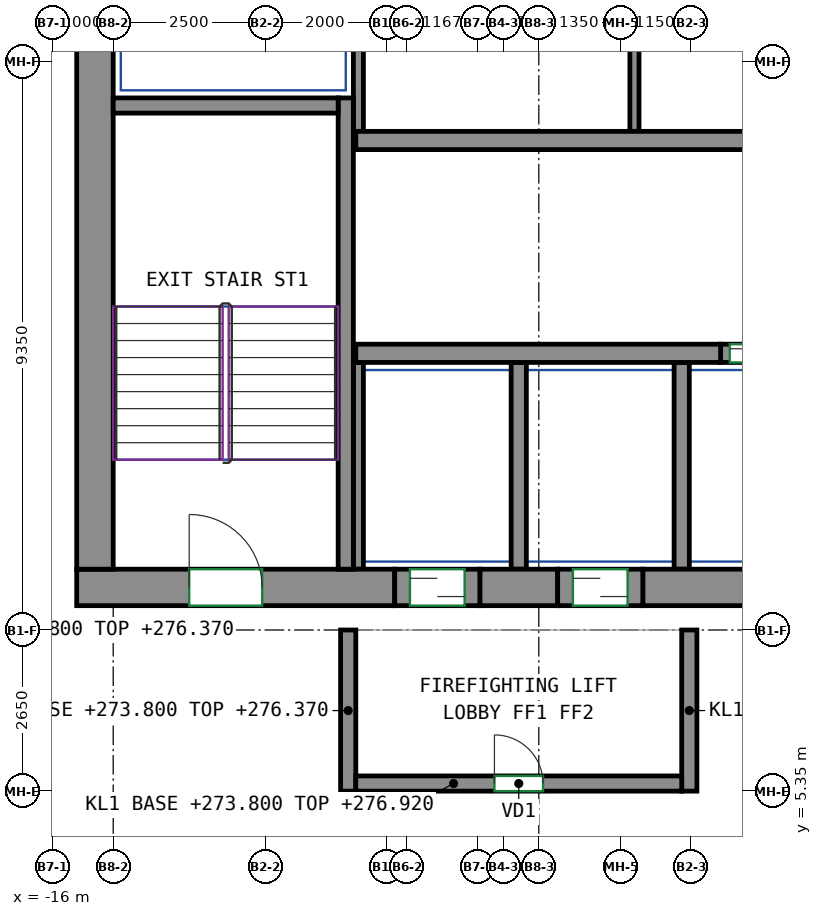
"""IFC4 building model, lengths in metres.
Left out: names, types, materials, properties, quantities, classifications, styles, units other than length and angle.
Written with IfcOpenShell. Run it as: python <this file> out.ifc"""

import sys

from ifc_helpers import new_model, si_unit, direction, frame, frame_2d, origin, place, context, subcontext, project, spatial, rectangle, extrude, source, transform, mapped, element, fill, save


model = new_model("IFC4")
c1 = context("Model", 3, precision=1e-05, world=origin(), true_north=direction((0.0, 1.0)))
c2 = subcontext(c1, "Body", "Model", "MODEL_VIEW")
j1 = project(units=[si_unit("LENGTHUNIT", "METRE"), si_unit("PLANEANGLEUNIT", "RADIAN")], contexts=[c1])
p1 = place(None, origin())
s1 = spatial("IfcSite", under=j1, at=p1, CompositionType="ELEMENT")
p2 = place(p1, origin())
s2 = spatial("IfcBuilding", under=s1, at=p2, CompositionType="ELEMENT")
p3 = place(p2, frame((0.0, 0.0, 273.8)))
s3 = spatial("IfcBuildingStorey", under=s2, at=p3, CompositionType="ELEMENT", Elevation=273.8)
m1 = source(origin(), c2, "Body", "SweptSolid", [
    extrude(rectangle(XDim=5.23, YDim=0.6, at=frame_2d((2.615, 0.0))), origin(), (0.0, 0.0, 1.0), 3.12),
])
p4 = place(p3, frame((-15.6, 8.7, 0.0), z_axis=(0.0, 0.0, 1.0), x_axis=(1.0, 0.0, 0.0)))
e1 = element("IfcWall", 1, at=p4, inside=s3, PredefinedType="SHEAR", context=c2, shape_type="MappedRepresentation", body=[
    mapped(m1, transform((0.0, 0.0, 0.0))),
])
p5 = place(p4, frame((1.85, 0.0, 0.0)))
e2 = element("IfcOpeningElement", 2, at=p5, cuts=e1, PredefinedType="OPENING", context=c2, shape_type="SweptSolid", body=[
    extrude(rectangle(XDim=1.2, YDim=2.1, at=frame_2d((0.6, 1.05))), frame((0.0, 0.31, 0.0), z_axis=(0.0, -1.0, 0.0), x_axis=(1.0, 0.0, 0.0)), (0.0, 0.0, 1.0), 0.62),
])
m2 = source(origin(), c2, "Body", "SweptSolid", [
    extrude(rectangle(XDim=1.28, YDim=0.6, at=frame_2d((0.64, 0.0))), origin(), (0.0, 0.0, 1.0), 3.12),
])
p6 = place(p3, frame((-8.97, 8.7, 0.0), z_axis=(0.0, 0.0, 1.0), x_axis=(1.0, 0.0, 0.0)))
e3 = element("IfcWall", 3, at=p6, inside=s3, PredefinedType="SHEAR", context=c2, shape_type="MappedRepresentation", body=[
    mapped(m2, transform((0.0, 0.0, 0.0))),
])
m3 = source(origin(), c2, "Body", "SweptSolid", [
    extrude(rectangle(XDim=14.18, YDim=0.6, at=frame_2d((7.09, 0.0))), origin(), (0.0, 0.0, 1.0), 3.12),
])
p7 = place(p3, frame((-6.29, 8.7, 0.0), z_axis=(0.0, 0.0, 1.0), x_axis=(1.0, 0.0, 0.0)))
e4 = element("IfcWall", 4, at=p7, inside=s3, PredefinedType="SHEAR", context=c2, shape_type="MappedRepresentation", body=[
    mapped(m3, transform((0.0, 0.0, 0.0))),
])
m4 = source(origin(), c2, "Body", "SweptSolid", [
    extrude(rectangle(XDim=12.0, YDim=0.6, at=frame_2d((6.0, 0.0))), origin(), (0.0, 0.0, 1.0), 3.12),
])
p8 = place(p3, frame((-15.3, 9.0, 0.0), z_axis=(0.0, 0.0, 1.0), x_axis=(0.0, 1.0, 0.0)))
e5 = element("IfcWall", 5, at=p8, inside=s3, PredefinedType="SHEAR", context=c2, shape_type="MappedRepresentation", body=[
    mapped(m4, transform((0.0, 0.0, 0.0))),
])
m5 = source(origin(), c2, "Body", "SweptSolid", [
    extrude(rectangle(XDim=7.75, YDim=0.25, at=frame_2d((3.875, 0.0))), origin(), (0.0, 0.0, 1.0), 3.12),
])
p9 = place(p3, frame((-11.175, 9.0, 0.0), z_axis=(0.0, 0.0, 1.0), x_axis=(0.0, 1.0, 0.0)))
e6 = element("IfcWall", 6, at=p9, inside=s3, PredefinedType="SHEAR", context=c2, shape_type="MappedRepresentation", body=[
    mapped(m5, transform((0.0, 0.0, 0.0))),
])
m6 = source(origin(), c2, "Body", "SweptSolid", [
    extrude(rectangle(XDim=3.7, YDim=0.25, at=frame_2d((1.85, 0.0))), origin(), (0.0, 0.0, 1.0), 3.12),
])
p10 = place(p3, frame((-15.0, 16.625, 0.0), z_axis=(0.0, 0.0, 1.0), x_axis=(1.0, 0.0, 0.0)))
e7 = element("IfcWall", 7, at=p10, inside=s3, PredefinedType="SHEAR", context=c2, shape_type="MappedRepresentation", body=[
    mapped(m6, transform((0.0, 0.0, 0.0))),
])
m7 = source(origin(), c2, "Body", "SweptSolid", [
    extrude(rectangle(XDim=6.0, YDim=0.3, at=frame_2d((3.0, 0.0))), origin(), (0.0, 0.0, 1.0), 3.12),
])
p11 = place(p3, frame((-11.01, 12.55, 0.0), z_axis=(0.0, 0.0, 1.0), x_axis=(1.0, 0.0, 0.0)))
e8 = element("IfcWall", 8, at=p11, inside=s3, PredefinedType="SHEAR", context=c2, shape_type="MappedRepresentation", body=[
    mapped(m7, transform((0.0, 0.0, 0.0))),
])
m8 = source(origin(), c2, "Body", "SweptSolid", [
    extrude(rectangle(XDim=22.08, YDim=0.3, at=frame_2d((11.04, 0.0))), origin(), (0.0, 0.0, 1.0), 3.12),
])
p12 = place(p3, frame((-11.01, 16.05, 0.0), z_axis=(0.0, 0.0, 1.0), x_axis=(1.0, 0.0, 0.0)))
e9 = element("IfcWall", 9, at=p12, inside=s3, PredefinedType="SHEAR", context=c2, shape_type="MappedRepresentation", body=[
    mapped(m8, transform((0.0, 0.0, 0.0))),
])
m9 = source(origin(), c2, "Body", "SweptSolid", [
    extrude(rectangle(XDim=1.4, YDim=0.3, at=frame_2d((0.7, 0.0))), origin(), (0.0, 0.0, 1.0), 3.12),
])
p13 = place(p3, frame((-5.01, 12.55, 0.0), z_axis=(0.0, 0.0, 1.0), x_axis=(1.0, 0.0, 0.0)))
e10 = element("IfcWall", 10, at=p13, inside=s3, PredefinedType="PARTITIONING", context=c2, shape_type="MappedRepresentation", body=[
    mapped(m9, transform((0.0, 0.0, 0.0))),
])
p14 = place(p13, frame((0.15, 0.0, 0.0)))
e11 = element("IfcOpeningElement", 11, at=p14, cuts=e10, PredefinedType="OPENING", context=c2, shape_type="SweptSolid", body=[
    extrude(rectangle(XDim=1.1, YDim=2.1, at=frame_2d((0.55, 1.05))), frame((0.0, 0.16, 0.0), z_axis=(0.0, -1.0, 0.0), x_axis=(1.0, 0.0, 0.0)), (0.0, 0.0, 1.0), 0.32),
])
m10 = source(origin(), c2, "Body", "SweptSolid", [
    extrude(rectangle(XDim=2.65, YDim=0.25, at=frame_2d((1.325, 0.0))), origin(), (0.0, 0.0, 1.0), 2.57),
])
for number, where, z_axis, x_axis in (
    (12, (-11.135, 5.35, 0.0), (0.0, 0.0, 1.0), (0.0, 1.0, 0.0)),
    (13, (-5.525, 5.35, 0.0), (0.0, 0.0, 1.0), (0.0, 1.0, 0.0)),
):
    element("IfcWall", number, at=place(p3, frame(where, z_axis=z_axis, x_axis=x_axis)), inside=s3, PredefinedType="PARTITIONING", context=c2, shape_type="MappedRepresentation", body=[
        mapped(m10, transform((0.0, 0.0, 0.0))),
    ])
m11 = source(origin(), c2, "Body", "SweptSolid", [
    extrude(rectangle(XDim=5.36, YDim=0.25, at=frame_2d((2.68, 0.0))), origin(), (0.0, 0.0, 1.0), 3.12),
])
p15 = place(p3, frame((-11.01, 5.475, 0.0), z_axis=(0.0, 0.0, 1.0), x_axis=(1.0, 0.0, 0.0)))
e14 = element("IfcWall", 14, at=p15, inside=s3, PredefinedType="PARTITIONING", context=c2, shape_type="MappedRepresentation", body=[
    mapped(m11, transform((0.0, 0.0, 0.0))),
])
p16 = place(p15, frame((2.28, 0.0, 0.0)))
e15 = element("IfcOpeningElement", 15, at=p16, cuts=e14, PredefinedType="OPENING", context=c2, shape_type="SweptSolid", body=[
    extrude(rectangle(XDim=0.8, YDim=2.0, at=frame_2d((0.4, 1.0))), frame((0.0, 0.135, 0.0), z_axis=(0.0, -1.0, 0.0), x_axis=(1.0, 0.0, 0.0)), (0.0, 0.0, 1.0), 0.27),
])
m12 = source(origin(), c2, "Body", "SweptSolid", [
    extrude(rectangle(XDim=4.8, YDim=0.165, at=frame_2d((2.4, 0.0))), origin(), (0.0, 0.0, 1.0), 3.12),
])
p17 = place(p3, frame((-10.968, 16.2, 0.0), z_axis=(0.0, 0.0, 1.0), x_axis=(0.0, 1.0, 0.0)))
e16 = element("IfcWall", 16, at=p17, inside=s3, PredefinedType="PARTITIONING", context=c2, shape_type="MappedRepresentation", body=[
    mapped(m12, transform((0.0, 0.0, 0.0))),
])
m13 = source(origin(), c2, "Body", "SweptSolid", [
    extrude(rectangle(XDim=3.4, YDim=0.165, at=frame_2d((1.7, 0.0))), origin(), (0.0, 0.0, 1.0), 3.12),
])
p18 = place(p3, frame((-10.968, 9.0, 0.0), z_axis=(0.0, 0.0, 1.0), x_axis=(0.0, 1.0, 0.0)))
e17 = element("IfcWall", 17, at=p18, inside=s3, PredefinedType="PARTITIONING", context=c2, shape_type="MappedRepresentation", body=[
    mapped(m13, transform((0.0, 0.0, 0.0))),
])
m14 = source(origin(), c2, "Body", "SweptSolid", [
    extrude(rectangle(XDim=3.4, YDim=0.25, at=frame_2d((1.7, 0.0))), origin(), (0.0, 0.0, 1.0), 3.12),
])
for number, where, z_axis, x_axis in (
    (18, (-5.65, 9.0, 0.0), (0.0, 0.0, 1.0), (0.0, 1.0, 0.0)),
    (19, (-8.33, 9.0, 0.0), (0.0, 0.0, 1.0), (0.0, 1.0, 0.0)),
):
    element("IfcWall", number, at=place(p3, frame(where, z_axis=z_axis, x_axis=x_axis)), inside=s3, PredefinedType="PARTITIONING", context=c2, shape_type="MappedRepresentation", body=[
        mapped(m14, transform((0.0, 0.0, 0.0))),
    ])
m15 = source(origin(), c2, "Body", "SweptSolid", [
    extrude(rectangle(XDim=4.8, YDim=0.15, at=frame_2d((2.4, 0.0))), origin(), (0.0, 0.0, 1.0), 3.12),
])
p19 = place(p3, frame((-6.427, 16.2, 0.0), z_axis=(0.0, 0.0, 1.0), x_axis=(0.0, 1.0, 0.0)))
e20 = element("IfcWall", 20, at=p19, inside=s3, PredefinedType="PARTITIONING", context=c2, shape_type="MappedRepresentation", body=[
    mapped(m15, transform((0.0, 0.0, 0.0))),
])
m16 = source(origin(), c2, "Body", "SweptSolid", [
    extrude(rectangle(XDim=1.4, YDim=0.6, at=frame_2d((0.7, 0.0))), origin(), (0.0, 0.0, 1.0), 2.7),
])
p20 = place(p3, frame((-10.37, 8.7, 0.0), z_axis=(0.0, 0.0, 1.0), x_axis=(1.0, 0.0, 0.0)))
e21 = element("IfcWall", 21, at=p20, inside=s3, PredefinedType="PARTITIONING", context=c2, shape_type="MappedRepresentation", body=[
    mapped(m16, transform((0.0, 0.0, 0.0))),
])
p21 = place(p20, frame((0.25, 0.0, 0.0)))
e22 = element("IfcOpeningElement", 22, at=p21, cuts=e21, PredefinedType="OPENING", context=c2, shape_type="SweptSolid", body=[
    extrude(rectangle(XDim=0.9, YDim=2.1, at=frame_2d((0.45, 1.05))), frame((0.0, 0.31, 0.0), z_axis=(0.0, -1.0, 0.0), x_axis=(1.0, 0.0, 0.0)), (0.0, 0.0, 1.0), 0.62),
])
m17 = source(origin(), c2, "Body", "SweptSolid", [
    extrude(rectangle(XDim=1.4, YDim=0.6, at=frame_2d((0.7, 0.0))), origin(), (0.0, 0.0, 1.0), 2.7),
])
p22 = place(p3, frame((-7.69, 8.7, 0.0), z_axis=(0.0, 0.0, 1.0), x_axis=(1.0, 0.0, 0.0)))
e23 = element("IfcWall", 23, at=p22, inside=s3, PredefinedType="PARTITIONING", context=c2, shape_type="MappedRepresentation", body=[
    mapped(m17, transform((0.0, 0.0, 0.0))),
])
p23 = place(p22, frame((0.25, 0.0, 0.0)))
e24 = element("IfcOpeningElement", 24, at=p23, cuts=e23, PredefinedType="OPENING", context=c2, shape_type="SweptSolid", body=[
    extrude(rectangle(XDim=0.9, YDim=2.1, at=frame_2d((0.45, 1.05))), frame((0.0, 0.31, 0.0), z_axis=(0.0, -1.0, 0.0), x_axis=(1.0, 0.0, 0.0)), (0.0, 0.0, 1.0), 0.62),
])
p24 = place(p16, origin())
e25 = element("IfcDoor", 25, at=p24, inside=s3, OperationType="SINGLE_SWING_LEFT", PredefinedType="DOOR", context=c2, shape_type="SweptSolid", body=[
    extrude(rectangle(XDim=0.8, YDim=2.0, at=frame_2d((0.4, 1.0))), frame((0.0, 0.025, 0.0), z_axis=(0.0, -1.0, 0.0), x_axis=(1.0, 0.0, 0.0)), (0.0, 0.0, 1.0), 0.05),
])
fill(e15, e25)
p25 = place(p21, origin())
e26 = element("IfcDoor", 26, at=p25, inside=s3, OperationType="SLIDING_TO_LEFT", PredefinedType="DOOR", context=c2, shape_type="SweptSolid", body=[
    extrude(rectangle(XDim=0.9, YDim=2.1, at=frame_2d((0.45, 1.05))), frame((0.0, 0.205, 0.0), z_axis=(0.0, -1.0, 0.0), x_axis=(1.0, 0.0, 0.0)), (0.0, 0.0, 1.0), 0.05),
])
fill(e22, e26)
p26 = place(p23, origin())
e27 = element("IfcDoor", 27, at=p26, inside=s3, OperationType="SLIDING_TO_RIGHT", PredefinedType="DOOR", context=c2, shape_type="SweptSolid", body=[
    extrude(rectangle(XDim=0.9, YDim=2.1, at=frame_2d((0.45, 1.05))), frame((0.0, 0.205, 0.0), z_axis=(0.0, -1.0, 0.0), x_axis=(1.0, 0.0, 0.0)), (0.0, 0.0, 1.0), 0.05),
])
fill(e24, e27)
p27 = place(p14, origin())
e28 = element("IfcDoor", 28, at=p27, inside=s3, OperationType="DOUBLE_DOOR_SLIDING", PredefinedType="DOOR", context=c2, shape_type="SweptSolid", body=[
    extrude(rectangle(XDim=1.1, YDim=2.1, at=frame_2d((0.55, 1.05))), frame((0.0, 0.025, 0.0), z_axis=(0.0, -1.0, 0.0), x_axis=(1.0, 0.0, 0.0)), (0.0, 0.0, 1.0), 0.05),
])
fill(e11, e28)
p28 = place(p5, origin())
e29 = element("IfcDoor", 29, at=p28, inside=s3, OperationType="DOUBLE_DOOR_SINGLE_SWING", PredefinedType="DOOR", context=c2, shape_type="SweptSolid", body=[
    extrude(rectangle(XDim=1.2, YDim=2.1, at=frame_2d((0.6, 1.05))), frame((0.0, 0.205, 0.0), z_axis=(0.0, -1.0, 0.0), x_axis=(1.0, 0.0, 0.0)), (0.0, 0.0, 1.0), 0.05),
])
fill(e2, e29)
save(model, sys.argv[1])
